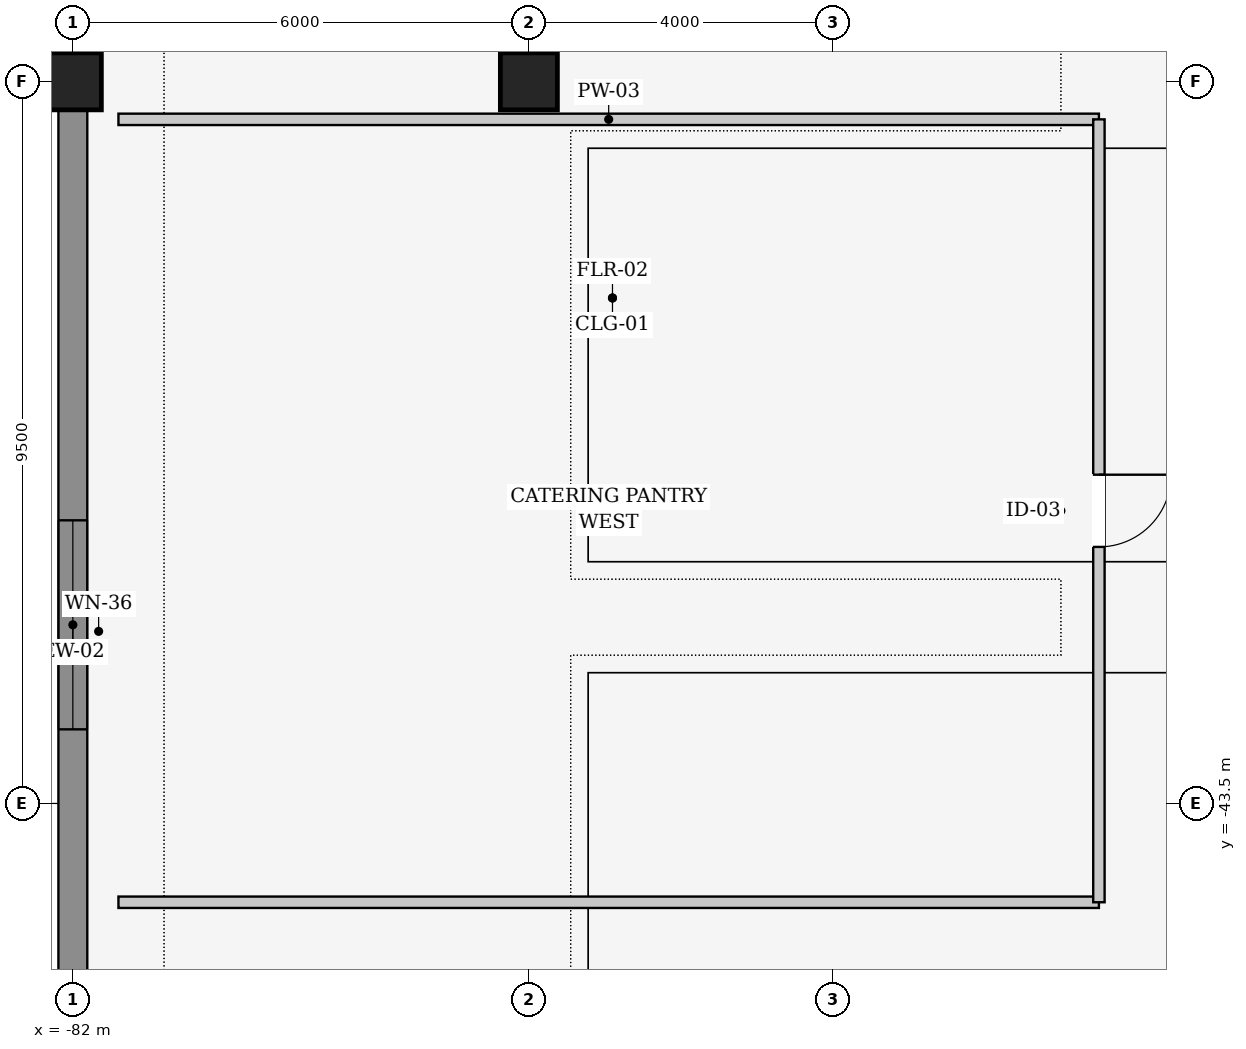
"""IFC4 building model, lengths in metres.
Left out: names, types, materials, properties, quantities, classifications, styles, units other than length and angle.
Written with IfcOpenShell. Run it as: python <this file> out.ifc"""

import sys

from ifc_helpers import new_model, si_unit, direction, frame, frame_2d, origin, origin_2d, place, context, subcontext, project, spatial, rectangle, extrude, element, fill, save


model = new_model("IFC4")
c1 = context("Model", 3, precision=1e-05, world=origin(), true_north=direction((0.0, 1.0)))
c2 = subcontext(c1, "Body", "Model", "MODEL_VIEW")
j1 = project(units=[si_unit("LENGTHUNIT", "METRE"), si_unit("PLANEANGLEUNIT", "RADIAN")], contexts=[c1])
p1 = place(None, origin())
s1 = spatial("IfcSite", under=j1, at=p1, CompositionType="ELEMENT")
p2 = place(p1, origin())
s2 = spatial("IfcBuilding", under=s1, at=p2, CompositionType="ELEMENT")
p3 = place(p2, frame((0.0, 0.0, 21.0)))
s3 = spatial("IfcBuildingStorey", under=s2, at=p3, CompositionType="ELEMENT", Elevation=21.0)
for number, where, z_axis, x_axis in (
    (1, (-82.0, -34.0, 0.0), (0.0, 0.0, 1.0), (1.0, 0.0, 0.0)),
    (2, (-76.0, -34.0, 0.0), (0.0, 0.0, 1.0), (1.0, 0.0, 0.0)),
):
    element("IfcColumn", number, at=place(p3, frame(where, z_axis=z_axis, x_axis=x_axis)), inside=s3, PredefinedType="COLUMN", context=c2, shape_type="SweptSolid", body=[
        extrude(rectangle(XDim=0.75, YDim=0.75, at=origin_2d()), origin(), (0.0, 0.0, 1.0), 5.4),
    ])
p4 = place(p3, frame((-82.0, -47.943, 0.0), z_axis=(0.0, 0.0, 1.0), x_axis=(0.0, 1.0, 0.0)))
e3 = element("IfcWall", 3, at=p4, inside=s3, PredefinedType="SOLIDWALL", context=c2, shape_type="SweptSolid", body=[
    extrude(rectangle(XDim=13.586, YDim=0.38, at=frame_2d((6.793, 0.0))), origin(), (0.0, 0.0, 1.0), 4.36),
])
p5 = place(p4, frame((5.418, 0.0, 0.9)))
e4 = element("IfcOpeningElement", 4, at=p5, cuts=e3, PredefinedType="OPENING", context=c2, shape_type="SweptSolid", body=[
    extrude(rectangle(XDim=2.75, YDim=2.0, at=frame_2d((1.375, 1.0))), frame((0.0, 0.2, 0.0), z_axis=(0.0, -1.0, 0.0), x_axis=(1.0, 0.0, 0.0)), (0.0, 0.0, 1.0), 0.4),
])
p6 = place(p3, frame((-81.4, -34.5, 0.0), z_axis=(0.0, 0.0, 1.0), x_axis=(1.0, 0.0, 0.0)))
e5 = element("IfcWall", 5, at=p6, inside=s3, PredefinedType="PARTITIONING", context=c2, shape_type="SweptSolid", body=[
    extrude(rectangle(XDim=12.9, YDim=0.15, at=frame_2d((6.45, 0.0))), origin(), (0.0, 0.0, 1.0), 4.145),
])
p7 = place(p3, frame((-68.5, -44.8, 0.0), z_axis=(0.0, 0.0, 1.0), x_axis=(-1.0, 0.0, 0.0)))
e6 = element("IfcWall", 6, at=p7, inside=s3, PredefinedType="PARTITIONING", context=c2, shape_type="SweptSolid", body=[
    extrude(rectangle(XDim=12.9, YDim=0.15, at=frame_2d((6.45, 0.0))), origin(), (0.0, 0.0, 1.0), 4.562),
])
p8 = place(p3, frame((-68.5, -34.5, 0.0), z_axis=(0.0, 0.0, 1.0), x_axis=(0.0, -1.0, 0.0)))
e7 = element("IfcWall", 7, at=p8, inside=s3, PredefinedType="PARTITIONING", context=c2, shape_type="SweptSolid", body=[
    extrude(rectangle(XDim=10.3, YDim=0.15, at=frame_2d((5.15, 0.0))), origin(), (0.0, 0.0, 1.0), 4.145),
])
p9 = place(p8, frame((4.675, 0.0, 0.0)))
e8 = element("IfcOpeningElement", 8, at=p9, cuts=e7, PredefinedType="OPENING", context=c2, shape_type="SweptSolid", body=[
    extrude(rectangle(XDim=0.95, YDim=2.15, at=frame_2d((0.475, 1.075))), frame((0.0, 0.085, 0.0), z_axis=(0.0, -1.0, 0.0), x_axis=(1.0, 0.0, 0.0)), (0.0, 0.0, 1.0), 0.17),
])
p10 = place(p5, origin())
e9 = element("IfcWindow", 9, at=p10, inside=s3, PartitioningType="SINGLE_PANEL", PredefinedType="WINDOW", context=c2, shape_type="SweptSolid", body=[
    extrude(rectangle(XDim=2.75, YDim=2.0, at=frame_2d((1.375, 1.0))), frame((0.0, 0.03, 0.0), z_axis=(0.0, -1.0, 0.0), x_axis=(1.0, 0.0, 0.0)), (0.0, 0.0, 1.0), 0.06),
])
fill(e4, e9)
p11 = place(p9, origin())
e10 = element("IfcDoor", 10, at=p11, inside=s3, OperationType="SINGLE_SWING_LEFT", PredefinedType="DOOR", context=c2, shape_type="SweptSolid", body=[
    extrude(rectangle(XDim=0.95, YDim=2.15, at=frame_2d((0.475, 1.075))), frame((0.0, 0.025, 0.0), z_axis=(0.0, -1.0, 0.0), x_axis=(1.0, 0.0, 0.0)), (0.0, 0.0, 1.0), 0.05),
])
fill(e8, e10)
save(model, sys.argv[1])
